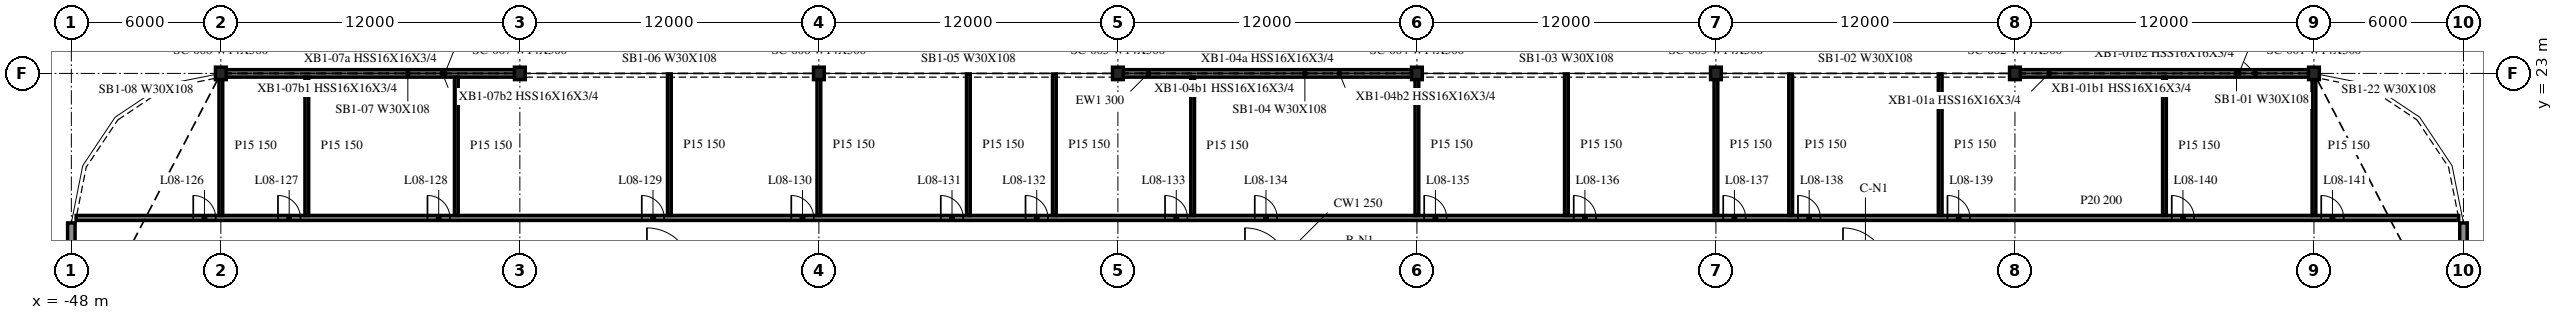
"""IFC4 building model, lengths in metres.
Left out: names, types, materials, properties, quantities, classifications, styles, units other than length and angle.
Written with IfcOpenShell. Run it as: python <this file> out.ifc"""

import sys

from ifc_helpers import new_model, si_unit, direction, frame, frame_2d, origin, origin_2d, place, context, subcontext, project, spatial, rectangle, i_section, extrude, element, fill, save


model = new_model("IFC4")
c1 = context("Model", 3, precision=1e-05, world=origin(), true_north=direction((0.0, 1.0)))
c2 = subcontext(c1, "Body", "Model", "MODEL_VIEW")
j1 = project(units=[si_unit("LENGTHUNIT", "METRE"), si_unit("PLANEANGLEUNIT", "RADIAN")], contexts=[c1])
p1 = place(None, origin())
s1 = spatial("IfcSite", under=j1, at=p1, CompositionType="ELEMENT")
p2 = place(p1, origin())
s2 = spatial("IfcBuilding", under=s1, at=p2, CompositionType="ELEMENT")
p3 = place(p2, frame((0.0, 0.0, 37.3)))
s3 = spatial("IfcBuildingStorey", under=s2, at=p3, CompositionType="ELEMENT", Elevation=37.3)
for number, where, z_axis, x_axis in (
    (1, (42.0, 23.0, -0.34), (0.0, 0.0, 1.0), (1.0, 0.0, 0.0)),
    (2, (30.0, 23.0, -0.34), (0.0, 0.0, 1.0), (1.0, 0.0, 0.0)),
    (3, (18.0, 23.0, -0.34), (0.0, 0.0, 1.0), (1.0, 0.0, 0.0)),
    (4, (6.0, 23.0, -0.34), (0.0, 0.0, 1.0), (1.0, 0.0, 0.0)),
    (5, (-6.0, 23.0, -0.34), (0.0, 0.0, 1.0), (1.0, 0.0, 0.0)),
    (6, (-18.0, 23.0, -0.34), (0.0, 0.0, 1.0), (1.0, 0.0, 0.0)),
    (7, (-30.0, 23.0, -0.34), (0.0, 0.0, 1.0), (1.0, 0.0, 0.0)),
    (8, (-42.0, 23.0, -0.34), (0.0, 0.0, 1.0), (1.0, 0.0, 0.0)),
):
    element("IfcColumn", number, at=place(p3, frame(where, z_axis=z_axis, x_axis=x_axis)), inside=s3, PredefinedType="COLUMN", context=c2, shape_type="SweptSolid", body=[
        extrude(i_section(OverallWidth=0.432, OverallDepth=0.498, WebThickness=0.056, FlangeThickness=0.089, at=origin_2d()), origin(), (0.0, 0.0, 1.0), 4.09),
    ])
for number, where, z_axis, x_axis in (
    (9, (41.972, 23.0, 0.0), (0.0, 0.0, 1.0), (-1.0, 0.0, 0.0)),
    (10, (5.972, 23.0, 0.0), (0.0, 0.0, 1.0), (-1.0, 0.0, 0.0)),
    (11, (-30.028, 23.0, 0.0), (0.0, 0.0, 1.0), (-1.0, 0.0, 0.0)),
):
    element("IfcWall", number, at=place(p3, frame(where, z_axis=z_axis, x_axis=x_axis)), inside=s3, PredefinedType="NOTDEFINED", context=c2, shape_type="SweptSolid", body=[
        extrude(rectangle(XDim=11.944, YDim=0.3, at=frame_2d((5.972, 0.0))), origin(), (0.0, 0.0, 1.0), 3.75),
    ])
for number, where, z_axis, x_axis in (
    (12, (-48.0, 17.0, 0.0), (0.0, 0.0, 1.0), (0.0, -1.0, 0.0)),
    (13, (48.0, 11.749, 0.0), (0.0, 0.0, 1.0), (0.0, 1.0, 0.0)),
):
    element("IfcWall", number, at=place(p3, frame(where, z_axis=z_axis, x_axis=x_axis)), inside=s3, PredefinedType="NOTDEFINED", context=c2, shape_type="SweptSolid", body=[
        extrude(rectangle(XDim=5.251, YDim=0.3, at=frame_2d((2.625, 0.0))), origin(), (0.0, 0.0, 1.0), 3.75),
    ])
p4 = place(p3, frame((-47.807, 17.2, 0.0), z_axis=(0.0, 0.0, 1.0), x_axis=(1.0, 0.0, 0.0)))
e14 = element("IfcWall", 14, at=p4, inside=s3, PredefinedType="PARTITIONING", context=c2, shape_type="SweptSolid", body=[
    extrude(rectangle(XDim=95.615, YDim=0.2, at=frame_2d((47.807, 0.0))), origin(), (0.0, 0.0, 1.0), 3.75),
])
p5 = place(p4, frame((4.7, 0.0, 0.0)))
e15 = element("IfcOpeningElement", 15, at=p5, cuts=e14, PredefinedType="OPENING", context=c2, shape_type="SweptSolid", body=[
    extrude(rectangle(XDim=0.9, YDim=2.1, at=frame_2d((0.45, 1.05))), frame((0.0, 0.11, 0.0), z_axis=(0.0, -1.0, 0.0), x_axis=(1.0, 0.0, 0.0)), (0.0, 0.0, 1.0), 0.22),
])
p6 = place(p4, frame((8.1, 0.0, 0.0)))
e16 = element("IfcOpeningElement", 16, at=p6, cuts=e14, PredefinedType="OPENING", context=c2, shape_type="SweptSolid", body=[
    extrude(rectangle(XDim=0.9, YDim=2.1, at=frame_2d((0.45, 1.05))), frame((0.0, 0.11, 0.0), z_axis=(0.0, -1.0, 0.0), x_axis=(1.0, 0.0, 0.0)), (0.0, 0.0, 1.0), 0.22),
])
p7 = place(p4, frame((14.1, 0.0, 0.0)))
e17 = element("IfcOpeningElement", 17, at=p7, cuts=e14, PredefinedType="OPENING", context=c2, shape_type="SweptSolid", body=[
    extrude(rectangle(XDim=0.9, YDim=2.1, at=frame_2d((0.45, 1.05))), frame((0.0, 0.11, 0.0), z_axis=(0.0, -1.0, 0.0), x_axis=(1.0, 0.0, 0.0)), (0.0, 0.0, 1.0), 0.22),
])
p8 = place(p4, frame((22.7, 0.0, 0.0)))
e18 = element("IfcOpeningElement", 18, at=p8, cuts=e14, PredefinedType="OPENING", context=c2, shape_type="SweptSolid", body=[
    extrude(rectangle(XDim=0.9, YDim=2.1, at=frame_2d((0.45, 1.05))), frame((0.0, 0.11, 0.0), z_axis=(0.0, -1.0, 0.0), x_axis=(1.0, 0.0, 0.0)), (0.0, 0.0, 1.0), 0.22),
])
p9 = place(p4, frame((28.7, 0.0, 0.0)))
e19 = element("IfcOpeningElement", 19, at=p9, cuts=e14, PredefinedType="OPENING", context=c2, shape_type="SweptSolid", body=[
    extrude(rectangle(XDim=0.9, YDim=2.1, at=frame_2d((0.45, 1.05))), frame((0.0, 0.11, 0.0), z_axis=(0.0, -1.0, 0.0), x_axis=(1.0, 0.0, 0.0)), (0.0, 0.0, 1.0), 0.22),
])
p10 = place(p4, frame((34.7, 0.0, 0.0)))
e20 = element("IfcOpeningElement", 20, at=p10, cuts=e14, PredefinedType="OPENING", context=c2, shape_type="SweptSolid", body=[
    extrude(rectangle(XDim=0.9, YDim=2.1, at=frame_2d((0.45, 1.05))), frame((0.0, 0.11, 0.0), z_axis=(0.0, -1.0, 0.0), x_axis=(1.0, 0.0, 0.0)), (0.0, 0.0, 1.0), 0.22),
])
p11 = place(p4, frame((38.1, 0.0, 0.0)))
e21 = element("IfcOpeningElement", 21, at=p11, cuts=e14, PredefinedType="OPENING", context=c2, shape_type="SweptSolid", body=[
    extrude(rectangle(XDim=0.9, YDim=2.1, at=frame_2d((0.45, 1.05))), frame((0.0, 0.11, 0.0), z_axis=(0.0, -1.0, 0.0), x_axis=(1.0, 0.0, 0.0)), (0.0, 0.0, 1.0), 0.22),
])
p12 = place(p4, frame((43.7, 0.0, 0.0)))
e22 = element("IfcOpeningElement", 22, at=p12, cuts=e14, PredefinedType="OPENING", context=c2, shape_type="SweptSolid", body=[
    extrude(rectangle(XDim=0.9, YDim=2.1, at=frame_2d((0.45, 1.05))), frame((0.0, 0.11, 0.0), z_axis=(0.0, -1.0, 0.0), x_axis=(1.0, 0.0, 0.0)), (0.0, 0.0, 1.0), 0.22),
])
p13 = place(p4, frame((47.3, 0.0, 0.0)))
e23 = element("IfcOpeningElement", 23, at=p13, cuts=e14, PredefinedType="OPENING", context=c2, shape_type="SweptSolid", body=[
    extrude(rectangle(XDim=0.9, YDim=2.1, at=frame_2d((0.45, 1.05))), frame((0.0, 0.11, 0.0), z_axis=(0.0, -1.0, 0.0), x_axis=(1.0, 0.0, 0.0)), (0.0, 0.0, 1.0), 0.22),
])
p14 = place(p4, frame((54.1, 0.0, 0.0)))
e24 = element("IfcOpeningElement", 24, at=p14, cuts=e14, PredefinedType="OPENING", context=c2, shape_type="SweptSolid", body=[
    extrude(rectangle(XDim=0.9, YDim=2.1, at=frame_2d((0.45, 1.05))), frame((0.0, 0.11, 0.0), z_axis=(0.0, -1.0, 0.0), x_axis=(1.0, 0.0, 0.0)), (0.0, 0.0, 1.0), 0.22),
])
p15 = place(p4, frame((60.1, 0.0, 0.0)))
e25 = element("IfcOpeningElement", 25, at=p15, cuts=e14, PredefinedType="OPENING", context=c2, shape_type="SweptSolid", body=[
    extrude(rectangle(XDim=0.9, YDim=2.1, at=frame_2d((0.45, 1.05))), frame((0.0, 0.11, 0.0), z_axis=(0.0, -1.0, 0.0), x_axis=(1.0, 0.0, 0.0)), (0.0, 0.0, 1.0), 0.22),
])
p16 = place(p4, frame((66.1, 0.0, 0.0)))
e26 = element("IfcOpeningElement", 26, at=p16, cuts=e14, PredefinedType="OPENING", context=c2, shape_type="SweptSolid", body=[
    extrude(rectangle(XDim=0.9, YDim=2.1, at=frame_2d((0.45, 1.05))), frame((0.0, 0.11, 0.0), z_axis=(0.0, -1.0, 0.0), x_axis=(1.0, 0.0, 0.0)), (0.0, 0.0, 1.0), 0.22),
])
p17 = place(p4, frame((69.1, 0.0, 0.0)))
e27 = element("IfcOpeningElement", 27, at=p17, cuts=e14, PredefinedType="OPENING", context=c2, shape_type="SweptSolid", body=[
    extrude(rectangle(XDim=0.9, YDim=2.1, at=frame_2d((0.45, 1.05))), frame((0.0, 0.11, 0.0), z_axis=(0.0, -1.0, 0.0), x_axis=(1.0, 0.0, 0.0)), (0.0, 0.0, 1.0), 0.22),
])
p18 = place(p4, frame((75.1, 0.0, 0.0)))
e28 = element("IfcOpeningElement", 28, at=p18, cuts=e14, PredefinedType="OPENING", context=c2, shape_type="SweptSolid", body=[
    extrude(rectangle(XDim=0.9, YDim=2.1, at=frame_2d((0.45, 1.05))), frame((0.0, 0.11, 0.0), z_axis=(0.0, -1.0, 0.0), x_axis=(1.0, 0.0, 0.0)), (0.0, 0.0, 1.0), 0.22),
])
p19 = place(p4, frame((84.1, 0.0, 0.0)))
e29 = element("IfcOpeningElement", 29, at=p19, cuts=e14, PredefinedType="OPENING", context=c2, shape_type="SweptSolid", body=[
    extrude(rectangle(XDim=0.9, YDim=2.1, at=frame_2d((0.45, 1.05))), frame((0.0, 0.11, 0.0), z_axis=(0.0, -1.0, 0.0), x_axis=(1.0, 0.0, 0.0)), (0.0, 0.0, 1.0), 0.22),
])
p20 = place(p4, frame((90.1, 0.0, 0.0)))
e30 = element("IfcOpeningElement", 30, at=p20, cuts=e14, PredefinedType="OPENING", context=c2, shape_type="SweptSolid", body=[
    extrude(rectangle(XDim=0.9, YDim=2.1, at=frame_2d((0.45, 1.05))), frame((0.0, 0.11, 0.0), z_axis=(0.0, -1.0, 0.0), x_axis=(1.0, 0.0, 0.0)), (0.0, 0.0, 1.0), 0.22),
])
p21 = place(p3, frame((-42.0, 17.3, 0.0), z_axis=(0.0, 0.0, 1.0), x_axis=(0.0, 1.0, 0.0)))
e31 = element("IfcWall", 31, at=p21, inside=s3, PredefinedType="PARTITIONING", context=c2, shape_type="SweptSolid", body=[
    extrude(rectangle(XDim=5.547, YDim=0.15, at=frame_2d((2.773, 0.0))), origin(), (0.0, 0.0, 1.0), 3.75),
])
for number, where, z_axis, x_axis in (
    (32, (-38.55, 17.3, 0.0), (0.0, 0.0, 1.0), (0.0, 1.0, 0.0)),
    (33, (-32.55, 17.3, 0.0), (0.0, 0.0, 1.0), (0.0, 1.0, 0.0)),
):
    element("IfcWall", number, at=place(p3, frame(where, z_axis=z_axis, x_axis=x_axis)), inside=s3, PredefinedType="PARTITIONING", context=c2, shape_type="SweptSolid", body=[
        extrude(rectangle(XDim=5.55, YDim=0.15, at=frame_2d((2.775, 0.0))), origin(), (0.0, 0.0, 1.0), 3.75),
    ])
for number, where, z_axis, x_axis in (
    (34, (-24.0, 17.3, 0.0), (0.0, 0.0, 1.0), (0.0, 1.0, 0.0)),
    (35, (-18.0, 17.3, 0.0), (0.0, 0.0, 1.0), (0.0, 1.0, 0.0)),
    (36, (-12.0, 17.3, 0.0), (0.0, 0.0, 1.0), (0.0, 1.0, 0.0)),
    (37, (-8.55, 17.3, 0.0), (0.0, 0.0, 1.0), (0.0, 1.0, 0.0)),
):
    element("IfcWall", number, at=place(p3, frame(where, z_axis=z_axis, x_axis=x_axis)), inside=s3, PredefinedType="PARTITIONING", context=c2, shape_type="SweptSolid", body=[
        extrude(rectangle(XDim=5.675, YDim=0.15, at=frame_2d((2.837, 0.0))), origin(), (0.0, 0.0, 1.0), 3.75),
    ])
p22 = place(p3, frame((-3.0, 17.3, 0.0), z_axis=(0.0, 0.0, 1.0), x_axis=(0.0, 1.0, 0.0)))
e38 = element("IfcWall", 38, at=p22, inside=s3, PredefinedType="PARTITIONING", context=c2, shape_type="SweptSolid", body=[
    extrude(rectangle(XDim=5.55, YDim=0.15, at=frame_2d((2.775, 0.0))), origin(), (0.0, 0.0, 1.0), 3.75),
])
for number, where, z_axis, x_axis in (
    (39, (6.0, 17.3, 0.0), (0.0, 0.0, 1.0), (0.0, 1.0, 0.0)),
    (40, (12.0, 17.3, 0.0), (0.0, 0.0, 1.0), (0.0, 1.0, 0.0)),
    (41, (18.0, 17.3, 0.0), (0.0, 0.0, 1.0), (0.0, 1.0, 0.0)),
    (42, (21.0, 17.3, 0.0), (0.0, 0.0, 1.0), (0.0, 1.0, 0.0)),
    (43, (27.0, 17.3, 0.0), (0.0, 0.0, 1.0), (0.0, 1.0, 0.0)),
):
    element("IfcWall", number, at=place(p3, frame(where, z_axis=z_axis, x_axis=x_axis)), inside=s3, PredefinedType="PARTITIONING", context=c2, shape_type="SweptSolid", body=[
        extrude(rectangle(XDim=5.675, YDim=0.15, at=frame_2d((2.837, 0.0))), origin(), (0.0, 0.0, 1.0), 3.75),
    ])
p23 = place(p3, frame((36.0, 17.3, 0.0), z_axis=(0.0, 0.0, 1.0), x_axis=(0.0, 1.0, 0.0)))
e44 = element("IfcWall", 44, at=p23, inside=s3, PredefinedType="PARTITIONING", context=c2, shape_type="SweptSolid", body=[
    extrude(rectangle(XDim=5.55, YDim=0.15, at=frame_2d((2.775, 0.0))), origin(), (0.0, 0.0, 1.0), 3.75),
])
p24 = place(p3, frame((42.0, 17.3, 0.0), z_axis=(0.0, 0.0, 1.0), x_axis=(0.0, 1.0, 0.0)))
e45 = element("IfcWall", 45, at=p24, inside=s3, PredefinedType="PARTITIONING", context=c2, shape_type="SweptSolid", body=[
    extrude(rectangle(XDim=5.547, YDim=0.15, at=frame_2d((2.773, 0.0))), origin(), (0.0, 0.0, 1.0), 3.75),
])
p25 = place(p5, origin())
e46 = element("IfcDoor", 46, at=p25, inside=s3, OperationType="SINGLE_SWING_LEFT", PredefinedType="DOOR", context=c2, shape_type="SweptSolid", body=[
    extrude(rectangle(XDim=0.9, YDim=2.1, at=frame_2d((0.45, 1.05))), frame((0.0, 0.025, 0.0), z_axis=(0.0, -1.0, 0.0), x_axis=(1.0, 0.0, 0.0)), (0.0, 0.0, 1.0), 0.05),
])
fill(e15, e46)
p26 = place(p6, origin())
e47 = element("IfcDoor", 47, at=p26, inside=s3, OperationType="SINGLE_SWING_LEFT", PredefinedType="DOOR", context=c2, shape_type="SweptSolid", body=[
    extrude(rectangle(XDim=0.9, YDim=2.1, at=frame_2d((0.45, 1.05))), frame((0.0, 0.025, 0.0), z_axis=(0.0, -1.0, 0.0), x_axis=(1.0, 0.0, 0.0)), (0.0, 0.0, 1.0), 0.05),
])
fill(e16, e47)
p27 = place(p7, origin())
e48 = element("IfcDoor", 48, at=p27, inside=s3, OperationType="SINGLE_SWING_LEFT", PredefinedType="DOOR", context=c2, shape_type="SweptSolid", body=[
    extrude(rectangle(XDim=0.9, YDim=2.1, at=frame_2d((0.45, 1.05))), frame((0.0, 0.025, 0.0), z_axis=(0.0, -1.0, 0.0), x_axis=(1.0, 0.0, 0.0)), (0.0, 0.0, 1.0), 0.05),
])
fill(e17, e48)
p28 = place(p8, origin())
e49 = element("IfcDoor", 49, at=p28, inside=s3, OperationType="SINGLE_SWING_LEFT", PredefinedType="DOOR", context=c2, shape_type="SweptSolid", body=[
    extrude(rectangle(XDim=0.9, YDim=2.1, at=frame_2d((0.45, 1.05))), frame((0.0, 0.025, 0.0), z_axis=(0.0, -1.0, 0.0), x_axis=(1.0, 0.0, 0.0)), (0.0, 0.0, 1.0), 0.05),
])
fill(e18, e49)
p29 = place(p9, origin())
e50 = element("IfcDoor", 50, at=p29, inside=s3, OperationType="SINGLE_SWING_LEFT", PredefinedType="DOOR", context=c2, shape_type="SweptSolid", body=[
    extrude(rectangle(XDim=0.9, YDim=2.1, at=frame_2d((0.45, 1.05))), frame((0.0, 0.025, 0.0), z_axis=(0.0, -1.0, 0.0), x_axis=(1.0, 0.0, 0.0)), (0.0, 0.0, 1.0), 0.05),
])
fill(e19, e50)
p30 = place(p10, origin())
e51 = element("IfcDoor", 51, at=p30, inside=s3, OperationType="SINGLE_SWING_LEFT", PredefinedType="DOOR", context=c2, shape_type="SweptSolid", body=[
    extrude(rectangle(XDim=0.9, YDim=2.1, at=frame_2d((0.45, 1.05))), frame((0.0, 0.025, 0.0), z_axis=(0.0, -1.0, 0.0), x_axis=(1.0, 0.0, 0.0)), (0.0, 0.0, 1.0), 0.05),
])
fill(e20, e51)
p31 = place(p11, origin())
e52 = element("IfcDoor", 52, at=p31, inside=s3, OperationType="SINGLE_SWING_LEFT", PredefinedType="DOOR", context=c2, shape_type="SweptSolid", body=[
    extrude(rectangle(XDim=0.9, YDim=2.1, at=frame_2d((0.45, 1.05))), frame((0.0, 0.025, 0.0), z_axis=(0.0, -1.0, 0.0), x_axis=(1.0, 0.0, 0.0)), (0.0, 0.0, 1.0), 0.05),
])
fill(e21, e52)
p32 = place(p12, origin())
e53 = element("IfcDoor", 53, at=p32, inside=s3, OperationType="SINGLE_SWING_LEFT", PredefinedType="DOOR", context=c2, shape_type="SweptSolid", body=[
    extrude(rectangle(XDim=0.9, YDim=2.1, at=frame_2d((0.45, 1.05))), frame((0.0, 0.025, 0.0), z_axis=(0.0, -1.0, 0.0), x_axis=(1.0, 0.0, 0.0)), (0.0, 0.0, 1.0), 0.05),
])
fill(e22, e53)
p33 = place(p13, origin())
e54 = element("IfcDoor", 54, at=p33, inside=s3, OperationType="SINGLE_SWING_LEFT", PredefinedType="DOOR", context=c2, shape_type="SweptSolid", body=[
    extrude(rectangle(XDim=0.9, YDim=2.1, at=frame_2d((0.45, 1.05))), frame((0.0, 0.025, 0.0), z_axis=(0.0, -1.0, 0.0), x_axis=(1.0, 0.0, 0.0)), (0.0, 0.0, 1.0), 0.05),
])
fill(e23, e54)
p34 = place(p14, origin())
e55 = element("IfcDoor", 55, at=p34, inside=s3, OperationType="SINGLE_SWING_RIGHT", PredefinedType="DOOR", context=c2, shape_type="SweptSolid", body=[
    extrude(rectangle(XDim=0.9, YDim=2.1, at=frame_2d((0.45, 1.05))), frame((0.0, 0.025, 0.0), z_axis=(0.0, -1.0, 0.0), x_axis=(1.0, 0.0, 0.0)), (0.0, 0.0, 1.0), 0.05),
])
fill(e24, e55)
p35 = place(p15, origin())
e56 = element("IfcDoor", 56, at=p35, inside=s3, OperationType="SINGLE_SWING_RIGHT", PredefinedType="DOOR", context=c2, shape_type="SweptSolid", body=[
    extrude(rectangle(XDim=0.9, YDim=2.1, at=frame_2d((0.45, 1.05))), frame((0.0, 0.025, 0.0), z_axis=(0.0, -1.0, 0.0), x_axis=(1.0, 0.0, 0.0)), (0.0, 0.0, 1.0), 0.05),
])
fill(e25, e56)
p36 = place(p16, origin())
e57 = element("IfcDoor", 57, at=p36, inside=s3, OperationType="SINGLE_SWING_RIGHT", PredefinedType="DOOR", context=c2, shape_type="SweptSolid", body=[
    extrude(rectangle(XDim=0.9, YDim=2.1, at=frame_2d((0.45, 1.05))), frame((0.0, 0.025, 0.0), z_axis=(0.0, -1.0, 0.0), x_axis=(1.0, 0.0, 0.0)), (0.0, 0.0, 1.0), 0.05),
])
fill(e26, e57)
p37 = place(p17, origin())
e58 = element("IfcDoor", 58, at=p37, inside=s3, OperationType="SINGLE_SWING_RIGHT", PredefinedType="DOOR", context=c2, shape_type="SweptSolid", body=[
    extrude(rectangle(XDim=0.9, YDim=2.1, at=frame_2d((0.45, 1.05))), frame((0.0, 0.025, 0.0), z_axis=(0.0, -1.0, 0.0), x_axis=(1.0, 0.0, 0.0)), (0.0, 0.0, 1.0), 0.05),
])
fill(e27, e58)
p38 = place(p18, origin())
e59 = element("IfcDoor", 59, at=p38, inside=s3, OperationType="SINGLE_SWING_RIGHT", PredefinedType="DOOR", context=c2, shape_type="SweptSolid", body=[
    extrude(rectangle(XDim=0.9, YDim=2.1, at=frame_2d((0.45, 1.05))), frame((0.0, 0.025, 0.0), z_axis=(0.0, -1.0, 0.0), x_axis=(1.0, 0.0, 0.0)), (0.0, 0.0, 1.0), 0.05),
])
fill(e28, e59)
p39 = place(p19, origin())
e60 = element("IfcDoor", 60, at=p39, inside=s3, OperationType="SINGLE_SWING_RIGHT", PredefinedType="DOOR", context=c2, shape_type="SweptSolid", body=[
    extrude(rectangle(XDim=0.9, YDim=2.1, at=frame_2d((0.45, 1.05))), frame((0.0, 0.025, 0.0), z_axis=(0.0, -1.0, 0.0), x_axis=(1.0, 0.0, 0.0)), (0.0, 0.0, 1.0), 0.05),
])
fill(e29, e60)
p40 = place(p20, origin())
e61 = element("IfcDoor", 61, at=p40, inside=s3, OperationType="SINGLE_SWING_RIGHT", PredefinedType="DOOR", context=c2, shape_type="SweptSolid", body=[
    extrude(rectangle(XDim=0.9, YDim=2.1, at=frame_2d((0.45, 1.05))), frame((0.0, 0.025, 0.0), z_axis=(0.0, -1.0, 0.0), x_axis=(1.0, 0.0, 0.0)), (0.0, 0.0, 1.0), 0.05),
])
fill(e30, e61)
save(model, sys.argv[1])
